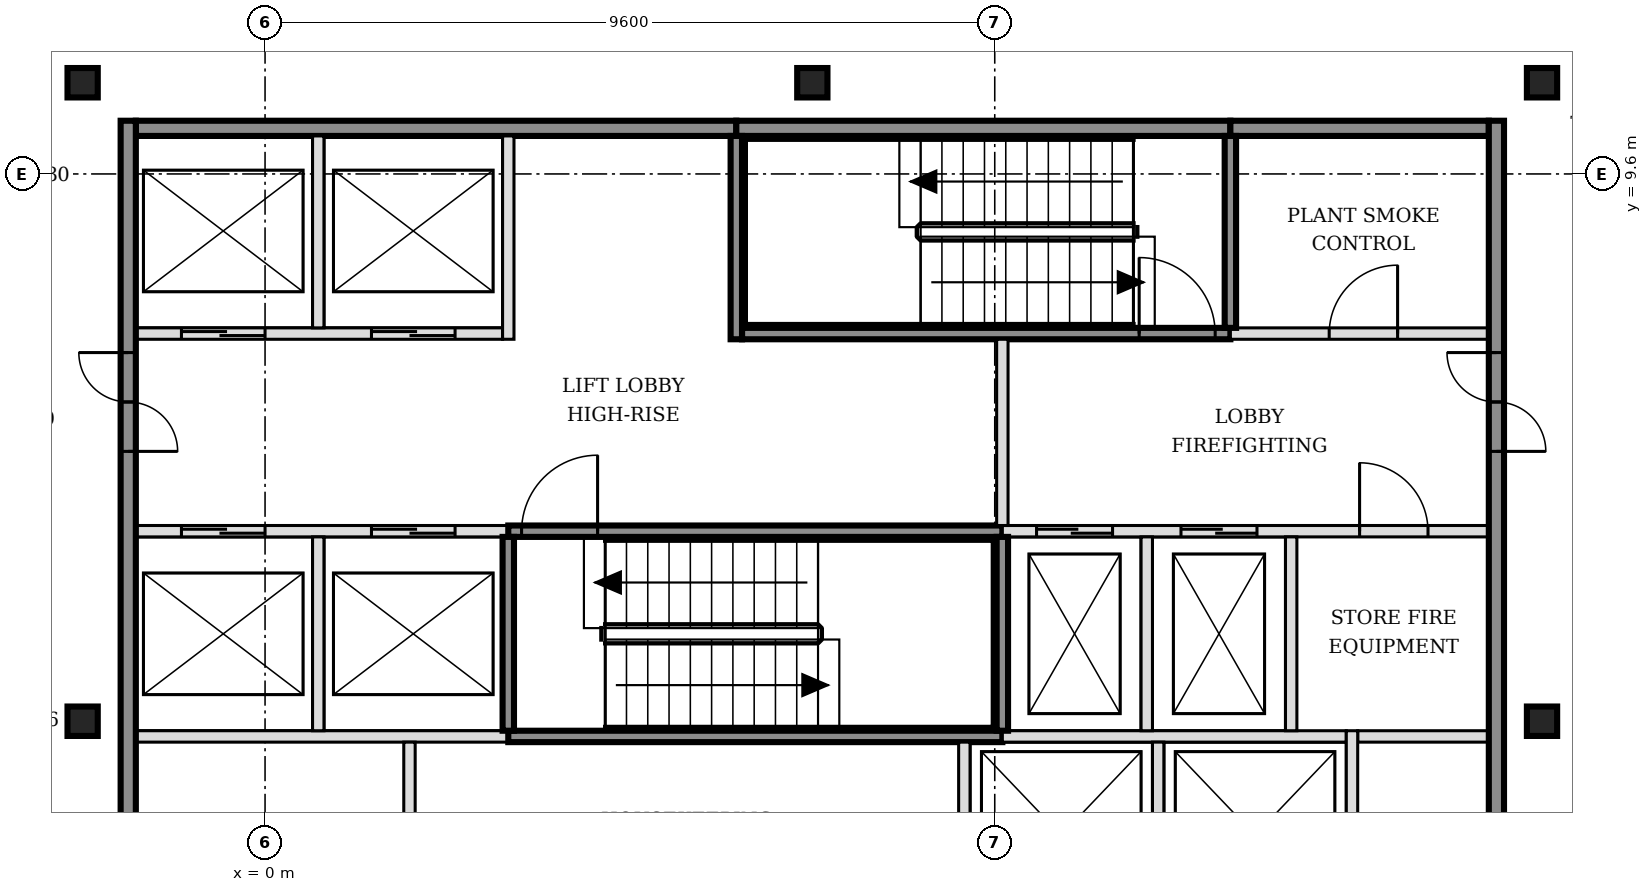
"""IFC4 building model, lengths in metres.
Left out: names, types, materials, properties, quantities, classifications, styles, units other than length and angle.
Written with IfcOpenShell. Run it as: python <this file> out.ifc"""

import sys

from ifc_helpers import new_model, si_unit, direction, frame, frame_2d, origin, origin_2d, place, context, subcontext, project, spatial, rectangle, i_section, extrude, element, fill, save


model = new_model("IFC4")
c1 = context("Model", 3, precision=1e-05, world=origin(), true_north=direction((0.0, 1.0)))
c2 = subcontext(c1, "Body", "Model", "MODEL_VIEW")
j1 = project(units=[si_unit("LENGTHUNIT", "METRE"), si_unit("PLANEANGLEUNIT", "RADIAN")], contexts=[c1])
p1 = place(None, origin())
s1 = spatial("IfcSite", under=j1, at=p1, CompositionType="ELEMENT")
p2 = place(p1, origin())
s2 = spatial("IfcBuilding", under=s1, at=p2, CompositionType="ELEMENT")
p3 = place(p2, frame((0.0, 0.0, 274.2)))
s3 = spatial("IfcBuildingStorey", under=s2, at=p3, CompositionType="ELEMENT", Elevation=274.2)
for number, where, z_axis, x_axis in (
    (1, (-2.4, 2.4, -0.15), (0.0, 0.0, 1.0), (1.0, 0.0, 0.0)),
    (2, (16.8, 2.4, -0.15), (0.0, 0.0, 1.0), (1.0, 0.0, 0.0)),
    (3, (-2.4, 10.8, -0.15), (0.0, 0.0, 1.0), (1.0, 0.0, 0.0)),
    (4, (7.2, 10.8, -0.15), (0.0, 0.0, 1.0), (1.0, 0.0, 0.0)),
    (5, (16.8, 10.8, -0.15), (0.0, 0.0, 1.0), (1.0, 0.0, 0.0)),
):
    element("IfcColumn", number, at=place(p3, frame(where, z_axis=z_axis, x_axis=x_axis)), inside=s3, PredefinedType="COLUMN", context=c2, shape_type="SweptSolid", body=[
        extrude(i_section(OverallWidth=0.398, OverallDepth=0.387, WebThickness=0.021, FlangeThickness=0.033, FilletRadius=0.015, at=origin_2d()), origin(), (0.0, 0.0, 1.0), 3.6),
    ])
p4 = place(p3, frame((-1.7, 2.2, 0.0), z_axis=(0.0, 0.0, 1.0), x_axis=(1.0, 0.0, 0.0)))
e6 = element("IfcWall", 6, at=p4, inside=s3, PredefinedType="SOLIDWALL", context=c2, shape_type="SweptSolid", body=[
    extrude(rectangle(XDim=4.9, YDim=0.15, at=frame_2d((2.45, 0.0))), origin(), (0.0, 0.0, 1.0), 3.45),
])
p5 = place(p3, frame((3.2, 2.2, 0.0), z_axis=(0.0, 0.0, 1.0), x_axis=(1.0, 0.0, 0.0)))
e7 = element("IfcWall", 7, at=p5, inside=s3, PredefinedType="SOLIDWALL", context=c2, shape_type="SweptSolid", body=[
    extrude(rectangle(XDim=6.5, YDim=0.15, at=frame_2d((3.25, 0.0))), origin(), (0.0, 0.0, 1.0), 3.45),
])
p6 = place(p3, frame((9.7, 2.2, 0.0), z_axis=(0.0, 0.0, 1.0), x_axis=(1.0, 0.0, 0.0)))
e8 = element("IfcWall", 8, at=p6, inside=s3, PredefinedType="SOLIDWALL", context=c2, shape_type="SweptSolid", body=[
    extrude(rectangle(XDim=4.525, YDim=0.15, at=frame_2d((2.263, 0.0))), origin(), (0.0, 0.0, 1.0), 3.45),
])
p7 = place(p3, frame((14.375, 2.2, 0.0), z_axis=(0.0, 0.0, 1.0), x_axis=(1.0, 0.0, 0.0)))
e9 = element("IfcWall", 9, at=p7, inside=s3, PredefinedType="PARTITIONING", context=c2, shape_type="SweptSolid", body=[
    extrude(rectangle(XDim=1.725, YDim=0.15, at=frame_2d((0.863, 0.0))), origin(), (0.0, 0.0, 1.0), 3.45),
])
p8 = place(p3, frame((-1.7, 4.9, 0.0), z_axis=(0.0, 0.0, 1.0), x_axis=(1.0, 0.0, 0.0)))
e10 = element("IfcWall", 10, at=p8, inside=s3, PredefinedType="SOLIDWALL", context=c2, shape_type="SweptSolid", body=[
    extrude(rectangle(XDim=4.9, YDim=0.15, at=frame_2d((2.45, 0.0))), origin(), (0.0, 0.0, 1.0), 3.45),
])
p9 = place(p8, frame((0.6, 0.0, 0.0)))
e11 = element("IfcOpeningElement", 11, at=p9, cuts=e10, PredefinedType="OPENING", context=c2, shape_type="SweptSolid", body=[
    extrude(rectangle(XDim=1.1, YDim=2.1, at=frame_2d((0.55, 1.05))), frame((0.0, 0.085, 0.0), z_axis=(0.0, -1.0, 0.0), x_axis=(1.0, 0.0, 0.0)), (0.0, 0.0, 1.0), 0.17),
])
p10 = place(p8, frame((3.1, 0.0, 0.0)))
e12 = element("IfcOpeningElement", 12, at=p10, cuts=e10, PredefinedType="OPENING", context=c2, shape_type="SweptSolid", body=[
    extrude(rectangle(XDim=1.1, YDim=2.1, at=frame_2d((0.55, 1.05))), frame((0.0, 0.085, 0.0), z_axis=(0.0, -1.0, 0.0), x_axis=(1.0, 0.0, 0.0)), (0.0, 0.0, 1.0), 0.17),
])
p11 = place(p3, frame((3.2, 4.9, 0.0), z_axis=(0.0, 0.0, 1.0), x_axis=(1.0, 0.0, 0.0)))
e13 = element("IfcWall", 13, at=p11, inside=s3, PredefinedType="SOLIDWALL", context=c2, shape_type="SweptSolid", body=[
    extrude(rectangle(XDim=6.5, YDim=0.15, at=frame_2d((3.25, 0.0))), origin(), (0.0, 0.0, 1.0), 3.45),
])
p12 = place(p11, frame((0.175, 0.0, 0.0)))
e14 = element("IfcOpeningElement", 14, at=p12, cuts=e13, PredefinedType="OPENING", context=c2, shape_type="SweptSolid", body=[
    extrude(rectangle(XDim=1.0, YDim=2.1, at=frame_2d((0.5, 1.05))), frame((0.0, 0.085, 0.0), z_axis=(0.0, -1.0, 0.0), x_axis=(1.0, 0.0, 0.0)), (0.0, 0.0, 1.0), 0.17),
])
p13 = place(p3, frame((9.7, 4.9, 0.0), z_axis=(0.0, 0.0, 1.0), x_axis=(1.0, 0.0, 0.0)))
e15 = element("IfcWall", 15, at=p13, inside=s3, PredefinedType="SOLIDWALL", context=c2, shape_type="SweptSolid", body=[
    extrude(rectangle(XDim=6.4, YDim=0.15, at=frame_2d((3.2, 0.0))), origin(), (0.0, 0.0, 1.0), 3.45),
])
p14 = place(p13, frame((0.45, 0.0, 0.0)))
e16 = element("IfcOpeningElement", 16, at=p14, cuts=e15, PredefinedType="OPENING", context=c2, shape_type="SweptSolid", body=[
    extrude(rectangle(XDim=1.0, YDim=2.1, at=frame_2d((0.5, 1.05))), frame((0.0, 0.085, 0.0), z_axis=(0.0, -1.0, 0.0), x_axis=(1.0, 0.0, 0.0)), (0.0, 0.0, 1.0), 0.17),
])
p15 = place(p13, frame((2.35, 0.0, 0.0)))
e17 = element("IfcOpeningElement", 17, at=p15, cuts=e15, PredefinedType="OPENING", context=c2, shape_type="SweptSolid", body=[
    extrude(rectangle(XDim=1.0, YDim=2.1, at=frame_2d((0.5, 1.05))), frame((0.0, 0.085, 0.0), z_axis=(0.0, -1.0, 0.0), x_axis=(1.0, 0.0, 0.0)), (0.0, 0.0, 1.0), 0.17),
])
p16 = place(p13, frame((4.7, 0.0, 0.0)))
e18 = element("IfcOpeningElement", 18, at=p16, cuts=e15, PredefinedType="OPENING", context=c2, shape_type="SweptSolid", body=[
    extrude(rectangle(XDim=0.9, YDim=2.1, at=frame_2d((0.45, 1.05))), frame((0.0, 0.085, 0.0), z_axis=(0.0, -1.0, 0.0), x_axis=(1.0, 0.0, 0.0)), (0.0, 0.0, 1.0), 0.17),
])
p17 = place(p3, frame((-1.7, 7.5, 0.0), z_axis=(0.0, 0.0, 1.0), x_axis=(1.0, 0.0, 0.0)))
e19 = element("IfcWall", 19, at=p17, inside=s3, PredefinedType="SOLIDWALL", context=c2, shape_type="SweptSolid", body=[
    extrude(rectangle(XDim=4.825, YDim=0.15, at=frame_2d((2.413, 0.0))), origin(), (0.0, 0.0, 1.0), 3.45),
])
p18 = place(p17, frame((0.6, 0.0, 0.0)))
e20 = element("IfcOpeningElement", 20, at=p18, cuts=e19, PredefinedType="OPENING", context=c2, shape_type="SweptSolid", body=[
    extrude(rectangle(XDim=1.1, YDim=2.1, at=frame_2d((0.55, 1.05))), frame((0.0, 0.085, 0.0), z_axis=(0.0, -1.0, 0.0), x_axis=(1.0, 0.0, 0.0)), (0.0, 0.0, 1.0), 0.17),
])
p19 = place(p17, frame((3.1, 0.0, 0.0)))
e21 = element("IfcOpeningElement", 21, at=p19, cuts=e19, PredefinedType="OPENING", context=c2, shape_type="SweptSolid", body=[
    extrude(rectangle(XDim=1.1, YDim=2.1, at=frame_2d((0.55, 1.05))), frame((0.0, 0.085, 0.0), z_axis=(0.0, -1.0, 0.0), x_axis=(1.0, 0.0, 0.0)), (0.0, 0.0, 1.0), 0.17),
])
p20 = place(p3, frame((6.275, 7.5, 0.0), z_axis=(0.0, 0.0, 1.0), x_axis=(1.0, 0.0, 0.0)))
e22 = element("IfcWall", 22, at=p20, inside=s3, PredefinedType="SOLIDWALL", context=c2, shape_type="SweptSolid", body=[
    extrude(rectangle(XDim=6.425, YDim=0.15, at=frame_2d((3.212, 0.0))), origin(), (0.0, 0.0, 1.0), 3.45),
])
p21 = place(p20, frame((5.225, 0.0, 0.0)))
e23 = element("IfcOpeningElement", 23, at=p21, cuts=e22, PredefinedType="OPENING", context=c2, shape_type="SweptSolid", body=[
    extrude(rectangle(XDim=1.0, YDim=2.1, at=frame_2d((0.5, 1.05))), frame((0.0, 0.085, 0.0), z_axis=(0.0, -1.0, 0.0), x_axis=(1.0, 0.0, 0.0)), (0.0, 0.0, 1.0), 0.17),
])
p22 = place(p3, frame((12.7, 7.5, 0.0), z_axis=(0.0, 0.0, 1.0), x_axis=(1.0, 0.0, 0.0)))
e24 = element("IfcWall", 24, at=p22, inside=s3, PredefinedType="SOLIDWALL", context=c2, shape_type="SweptSolid", body=[
    extrude(rectangle(XDim=3.4, YDim=0.15, at=frame_2d((1.7, 0.0))), origin(), (0.0, 0.0, 1.0), 3.45),
])
p23 = place(p22, frame((1.3, 0.0, 0.0)))
e25 = element("IfcOpeningElement", 25, at=p23, cuts=e24, PredefinedType="OPENING", context=c2, shape_type="SweptSolid", body=[
    extrude(rectangle(XDim=0.9, YDim=2.1, at=frame_2d((0.45, 1.05))), frame((0.0, 0.085, 0.0), z_axis=(0.0, -1.0, 0.0), x_axis=(1.0, 0.0, 0.0)), (0.0, 0.0, 1.0), 0.17),
])
p24 = place(p3, frame((-1.7, 10.2, 0.0), z_axis=(0.0, 0.0, 1.0), x_axis=(1.0, 0.0, 0.0)))
e26 = element("IfcWall", 26, at=p24, inside=s3, PredefinedType="SOLIDWALL", context=c2, shape_type="SweptSolid", body=[
    extrude(rectangle(XDim=7.9, YDim=0.2, at=frame_2d((3.95, 0.0))), origin(), (0.0, 0.0, 1.0), 3.45),
])
p25 = place(p3, frame((6.2, 10.2, 0.0), z_axis=(0.0, 0.0, 1.0), x_axis=(1.0, 0.0, 0.0)))
e27 = element("IfcWall", 27, at=p25, inside=s3, PredefinedType="SOLIDWALL", context=c2, shape_type="SweptSolid", body=[
    extrude(rectangle(XDim=6.5, YDim=0.2, at=frame_2d((3.25, 0.0))), origin(), (0.0, 0.0, 1.0), 3.45),
])
p26 = place(p3, frame((12.7, 10.2, 0.0), z_axis=(0.0, 0.0, 1.0), x_axis=(1.0, 0.0, 0.0)))
e28 = element("IfcWall", 28, at=p26, inside=s3, PredefinedType="SOLIDWALL", context=c2, shape_type="SweptSolid", body=[
    extrude(rectangle(XDim=3.4, YDim=0.2, at=frame_2d((1.7, 0.0))), origin(), (0.0, 0.0, 1.0), 3.45),
])
p27 = place(p3, frame((-1.8, -5.5, 0.0), z_axis=(0.0, 0.0, 1.0), x_axis=(0.0, 1.0, 0.0)))
e29 = element("IfcWall", 29, at=p27, inside=s3, PredefinedType="SOLIDWALL", context=c2, shape_type="SweptSolid", body=[
    extrude(rectangle(XDim=15.8, YDim=0.2, at=frame_2d((7.9, 0.0))), origin(), (0.0, 0.0, 1.0), 3.45),
])
p28 = place(p27, frame((3.05, 0.0, 0.0)))
e30 = element("IfcOpeningElement", 30, at=p28, cuts=e29, PredefinedType="OPENING", context=c2, shape_type="SweptSolid", body=[
    extrude(rectangle(XDim=1.3, YDim=2.1, at=frame_2d((0.65, 1.05))), frame((0.0, 0.11, 0.0), z_axis=(0.0, -1.0, 0.0), x_axis=(1.0, 0.0, 0.0)), (0.0, 0.0, 1.0), 0.22),
])
p29 = place(p27, frame((11.45, 0.0, 0.0)))
e31 = element("IfcOpeningElement", 31, at=p29, cuts=e29, PredefinedType="OPENING", context=c2, shape_type="SweptSolid", body=[
    extrude(rectangle(XDim=1.3, YDim=2.1, at=frame_2d((0.65, 1.05))), frame((0.0, 0.11, 0.0), z_axis=(0.0, -1.0, 0.0), x_axis=(1.0, 0.0, 0.0)), (0.0, 0.0, 1.0), 0.22),
])
p30 = place(p3, frame((0.7, 2.275, 0.0), z_axis=(0.0, 0.0, 1.0), x_axis=(0.0, 1.0, 0.0)))
e32 = element("IfcWall", 32, at=p30, inside=s3, PredefinedType="SOLIDWALL", context=c2, shape_type="SweptSolid", body=[
    extrude(rectangle(XDim=2.55, YDim=0.15, at=frame_2d((1.275, 0.0))), origin(), (0.0, 0.0, 1.0), 3.45),
])
p31 = place(p3, frame((0.7, 7.575, 0.0), z_axis=(0.0, 0.0, 1.0), x_axis=(0.0, 1.0, 0.0)))
e33 = element("IfcWall", 33, at=p31, inside=s3, PredefinedType="SOLIDWALL", context=c2, shape_type="SweptSolid", body=[
    extrude(rectangle(XDim=2.525, YDim=0.15, at=frame_2d((1.263, 0.0))), origin(), (0.0, 0.0, 1.0), 3.45),
])
p32 = place(p3, frame((1.9, -0.325, 0.0), z_axis=(0.0, 0.0, 1.0), x_axis=(0.0, 1.0, 0.0)))
e34 = element("IfcWall", 34, at=p32, inside=s3, PredefinedType="PARTITIONING", context=c2, shape_type="SweptSolid", body=[
    extrude(rectangle(XDim=2.45, YDim=0.15, at=frame_2d((1.225, 0.0))), origin(), (0.0, 0.0, 1.0), 3.45),
])
p33 = place(p3, frame((3.2, 2.275, 0.0), z_axis=(0.0, 0.0, 1.0), x_axis=(0.0, 1.0, 0.0)))
e35 = element("IfcWall", 35, at=p33, inside=s3, PredefinedType="SOLIDWALL", context=c2, shape_type="SweptSolid", body=[
    extrude(rectangle(XDim=2.55, YDim=0.15, at=frame_2d((1.275, 0.0))), origin(), (0.0, 0.0, 1.0), 3.45),
])
for number, where, z_axis, x_axis in (
    (36, (3.2, 7.425, 0.0), (0.0, 0.0, 1.0), (0.0, 1.0, 0.0)),
    (37, (6.2, 7.425, 0.0), (0.0, 0.0, 1.0), (0.0, 1.0, 0.0)),
):
    element("IfcWall", number, at=place(p3, frame(where, z_axis=z_axis, x_axis=x_axis)), inside=s3, PredefinedType="SOLIDWALL", context=c2, shape_type="SweptSolid", body=[
        extrude(rectangle(XDim=2.675, YDim=0.15, at=frame_2d((1.337, 0.0))), origin(), (0.0, 0.0, 1.0), 3.45),
    ])
p34 = place(p3, frame((9.2, -0.475, 0.0), z_axis=(0.0, 0.0, 1.0), x_axis=(0.0, 1.0, 0.0)))
e38 = element("IfcWall", 38, at=p34, inside=s3, PredefinedType="SOLIDWALL", context=c2, shape_type="SweptSolid", body=[
    extrude(rectangle(XDim=2.6, YDim=0.15, at=frame_2d((1.3, 0.0))), origin(), (0.0, 0.0, 1.0), 3.45),
])
p35 = place(p3, frame((9.7, 2.275, 0.0), z_axis=(0.0, 0.0, 1.0), x_axis=(0.0, 1.0, 0.0)))
e39 = element("IfcWall", 39, at=p35, inside=s3, PredefinedType="SOLIDWALL", context=c2, shape_type="SweptSolid", body=[
    extrude(rectangle(XDim=2.55, YDim=0.15, at=frame_2d((1.275, 0.0))), origin(), (0.0, 0.0, 1.0), 3.45),
])
p36 = place(p3, frame((9.7, 4.975, 0.0), z_axis=(0.0, 0.0, 1.0), x_axis=(0.0, 1.0, 0.0)))
e40 = element("IfcWall", 40, at=p36, inside=s3, PredefinedType="SOLIDWALL", context=c2, shape_type="SweptSolid", body=[
    extrude(rectangle(XDim=2.45, YDim=0.15, at=frame_2d((1.225, 0.0))), origin(), (0.0, 0.0, 1.0), 3.45),
])
p37 = place(p3, frame((11.6, 2.275, 0.0), z_axis=(0.0, 0.0, 1.0), x_axis=(0.0, 1.0, 0.0)))
e41 = element("IfcWall", 41, at=p37, inside=s3, PredefinedType="SOLIDWALL", context=c2, shape_type="SweptSolid", body=[
    extrude(rectangle(XDim=2.55, YDim=0.15, at=frame_2d((1.275, 0.0))), origin(), (0.0, 0.0, 1.0), 3.45),
])
p38 = place(p3, frame((11.75, -0.325, 0.0), z_axis=(0.0, 0.0, 1.0), x_axis=(0.0, 1.0, 0.0)))
e42 = element("IfcWall", 42, at=p38, inside=s3, PredefinedType="SOLIDWALL", context=c2, shape_type="SweptSolid", body=[
    extrude(rectangle(XDim=2.45, YDim=0.15, at=frame_2d((1.225, 0.0))), origin(), (0.0, 0.0, 1.0), 3.45),
])
p39 = place(p3, frame((12.7, 7.575, 0.0), z_axis=(0.0, 0.0, 1.0), x_axis=(0.0, 1.0, 0.0)))
e43 = element("IfcWall", 43, at=p39, inside=s3, PredefinedType="SOLIDWALL", context=c2, shape_type="SweptSolid", body=[
    extrude(rectangle(XDim=2.525, YDim=0.15, at=frame_2d((1.263, 0.0))), origin(), (0.0, 0.0, 1.0), 3.45),
])
p40 = place(p3, frame((13.5, 2.275, 0.0), z_axis=(0.0, 0.0, 1.0), x_axis=(0.0, 1.0, 0.0)))
e44 = element("IfcWall", 44, at=p40, inside=s3, PredefinedType="SOLIDWALL", context=c2, shape_type="SweptSolid", body=[
    extrude(rectangle(XDim=2.55, YDim=0.15, at=frame_2d((1.275, 0.0))), origin(), (0.0, 0.0, 1.0), 3.45),
])
p41 = place(p3, frame((14.3, -0.475, 0.0), z_axis=(0.0, 0.0, 1.0), x_axis=(0.0, 1.0, 0.0)))
e45 = element("IfcWall", 45, at=p41, inside=s3, PredefinedType="SOLIDWALL", context=c2, shape_type="SweptSolid", body=[
    extrude(rectangle(XDim=2.75, YDim=0.15, at=frame_2d((1.375, 0.0))), origin(), (0.0, 0.0, 1.0), 3.45),
])
p42 = place(p3, frame((16.2, -5.5, 0.0), z_axis=(0.0, 0.0, 1.0), x_axis=(0.0, 1.0, 0.0)))
e46 = element("IfcWall", 46, at=p42, inside=s3, PredefinedType="SOLIDWALL", context=c2, shape_type="SweptSolid", body=[
    extrude(rectangle(XDim=15.8, YDim=0.2, at=frame_2d((7.9, 0.0))), origin(), (0.0, 0.0, 1.0), 3.45),
])
p43 = place(p42, frame((3.05, 0.0, 0.0)))
e47 = element("IfcOpeningElement", 47, at=p43, cuts=e46, PredefinedType="OPENING", context=c2, shape_type="SweptSolid", body=[
    extrude(rectangle(XDim=1.3, YDim=2.1, at=frame_2d((0.65, 1.05))), frame((0.0, 0.11, 0.0), z_axis=(0.0, -1.0, 0.0), x_axis=(1.0, 0.0, 0.0)), (0.0, 0.0, 1.0), 0.22),
])
p44 = place(p42, frame((11.45, 0.0, 0.0)))
e48 = element("IfcOpeningElement", 48, at=p44, cuts=e46, PredefinedType="OPENING", context=c2, shape_type="SweptSolid", body=[
    extrude(rectangle(XDim=1.3, YDim=2.1, at=frame_2d((0.65, 1.05))), frame((0.0, 0.11, 0.0), z_axis=(0.0, -1.0, 0.0), x_axis=(1.0, 0.0, 0.0)), (0.0, 0.0, 1.0), 0.22),
])
p45 = place(p9, origin())
e49 = element("IfcDoor", 49, at=p45, inside=s3, OperationType="DOUBLE_DOOR_SLIDING", PredefinedType="DOOR", context=c2, shape_type="SweptSolid", body=[
    extrude(rectangle(XDim=1.1, YDim=2.1, at=frame_2d((0.55, 1.05))), frame((0.0, 0.025, 0.0), z_axis=(0.0, -1.0, 0.0), x_axis=(1.0, 0.0, 0.0)), (0.0, 0.0, 1.0), 0.05),
])
fill(e11, e49)
p46 = place(p10, origin())
e50 = element("IfcDoor", 50, at=p46, inside=s3, OperationType="DOUBLE_DOOR_SLIDING", PredefinedType="DOOR", context=c2, shape_type="SweptSolid", body=[
    extrude(rectangle(XDim=1.1, YDim=2.1, at=frame_2d((0.55, 1.05))), frame((0.0, 0.025, 0.0), z_axis=(0.0, -1.0, 0.0), x_axis=(1.0, 0.0, 0.0)), (0.0, 0.0, 1.0), 0.05),
])
fill(e12, e50)
p47 = place(p18, origin())
e51 = element("IfcDoor", 51, at=p47, inside=s3, OperationType="DOUBLE_DOOR_SLIDING", PredefinedType="DOOR", context=c2, shape_type="SweptSolid", body=[
    extrude(rectangle(XDim=1.1, YDim=2.1, at=frame_2d((0.55, 1.05))), frame((0.0, 0.025, 0.0), z_axis=(0.0, -1.0, 0.0), x_axis=(1.0, 0.0, 0.0)), (0.0, 0.0, 1.0), 0.05),
])
fill(e20, e51)
p48 = place(p19, origin())
e52 = element("IfcDoor", 52, at=p48, inside=s3, OperationType="DOUBLE_DOOR_SLIDING", PredefinedType="DOOR", context=c2, shape_type="SweptSolid", body=[
    extrude(rectangle(XDim=1.1, YDim=2.1, at=frame_2d((0.55, 1.05))), frame((0.0, 0.025, 0.0), z_axis=(0.0, -1.0, 0.0), x_axis=(1.0, 0.0, 0.0)), (0.0, 0.0, 1.0), 0.05),
])
fill(e21, e52)
p49 = place(p14, origin())
e53 = element("IfcDoor", 53, at=p49, inside=s3, OperationType="DOUBLE_DOOR_SLIDING", PredefinedType="DOOR", context=c2, shape_type="SweptSolid", body=[
    extrude(rectangle(XDim=1.0, YDim=2.1, at=frame_2d((0.5, 1.05))), frame((0.0, 0.025, 0.0), z_axis=(0.0, -1.0, 0.0), x_axis=(1.0, 0.0, 0.0)), (0.0, 0.0, 1.0), 0.05),
])
fill(e16, e53)
p50 = place(p15, origin())
e54 = element("IfcDoor", 54, at=p50, inside=s3, OperationType="DOUBLE_DOOR_SLIDING", PredefinedType="DOOR", context=c2, shape_type="SweptSolid", body=[
    extrude(rectangle(XDim=1.0, YDim=2.1, at=frame_2d((0.5, 1.05))), frame((0.0, 0.025, 0.0), z_axis=(0.0, -1.0, 0.0), x_axis=(1.0, 0.0, 0.0)), (0.0, 0.0, 1.0), 0.05),
])
fill(e17, e54)
p51 = place(p12, origin())
e55 = element("IfcDoor", 55, at=p51, inside=s3, OperationType="SINGLE_SWING_RIGHT", PredefinedType="DOOR", context=c2, shape_type="SweptSolid", body=[
    extrude(rectangle(XDim=1.0, YDim=2.1, at=frame_2d((0.5, 1.05))), frame((0.0, 0.025, 0.0), z_axis=(0.0, -1.0, 0.0), x_axis=(1.0, 0.0, 0.0)), (0.0, 0.0, 1.0), 0.05),
])
fill(e14, e55)
p52 = place(p21, origin())
e56 = element("IfcDoor", 56, at=p52, inside=s3, OperationType="SINGLE_SWING_LEFT", PredefinedType="DOOR", context=c2, shape_type="SweptSolid", body=[
    extrude(rectangle(XDim=1.0, YDim=2.1, at=frame_2d((0.5, 1.05))), frame((0.0, 0.025, 0.0), z_axis=(0.0, -1.0, 0.0), x_axis=(1.0, 0.0, 0.0)), (0.0, 0.0, 1.0), 0.05),
])
fill(e23, e56)
p53 = place(p29, origin())
e57 = element("IfcDoor", 57, at=p53, inside=s3, OperationType="DOUBLE_DOOR_SINGLE_SWING", PredefinedType="DOOR", context=c2, shape_type="SweptSolid", body=[
    extrude(rectangle(XDim=1.3, YDim=2.1, at=frame_2d((0.65, 1.05))), frame((0.0, 0.025, 0.0), z_axis=(0.0, -1.0, 0.0), x_axis=(1.0, 0.0, 0.0)), (0.0, 0.0, 1.0), 0.05),
])
fill(e31, e57)
p54 = place(p44, origin())
e58 = element("IfcDoor", 58, at=p54, inside=s3, OperationType="DOUBLE_DOOR_SINGLE_SWING", PredefinedType="DOOR", context=c2, shape_type="SweptSolid", body=[
    extrude(rectangle(XDim=1.3, YDim=2.1, at=frame_2d((0.65, 1.05))), frame((0.0, 0.025, 0.0), z_axis=(0.0, -1.0, 0.0), x_axis=(1.0, 0.0, 0.0)), (0.0, 0.0, 1.0), 0.05),
])
fill(e48, e58)
p55 = place(p16, origin())
e59 = element("IfcDoor", 59, at=p55, inside=s3, OperationType="SINGLE_SWING_LEFT", PredefinedType="DOOR", context=c2, shape_type="SweptSolid", body=[
    extrude(rectangle(XDim=0.9, YDim=2.1, at=frame_2d((0.45, 1.05))), frame((0.0, 0.025, 0.0), z_axis=(0.0, -1.0, 0.0), x_axis=(1.0, 0.0, 0.0)), (0.0, 0.0, 1.0), 0.05),
])
fill(e18, e59)
p56 = place(p23, origin())
e60 = element("IfcDoor", 60, at=p56, inside=s3, OperationType="SINGLE_SWING_RIGHT", PredefinedType="DOOR", context=c2, shape_type="SweptSolid", body=[
    extrude(rectangle(XDim=0.9, YDim=2.1, at=frame_2d((0.45, 1.05))), frame((0.0, 0.025, 0.0), z_axis=(0.0, -1.0, 0.0), x_axis=(1.0, 0.0, 0.0)), (0.0, 0.0, 1.0), 0.05),
])
fill(e25, e60)
save(model, sys.argv[1])
